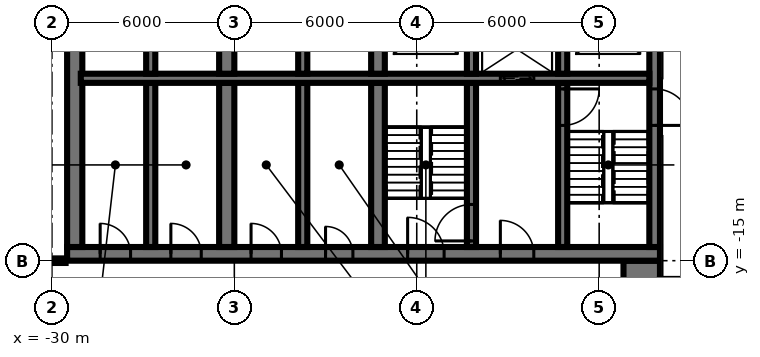
"""IFC4 building model, lengths in metres.
Left out: names, types, materials, properties, quantities, classifications, styles, units other than length and angle.
Written with IfcOpenShell. Run it as: python <this file> out.ifc"""

import sys

from ifc_helpers import new_model, si_unit, direction, frame, frame_2d, origin, place, context, subcontext, project, spatial, rectangle, extrude, element, fill, save


model = new_model("IFC4")
c1 = context("Model", 3, precision=1e-05, world=origin(), true_north=direction((0.0, 1.0)))
c2 = subcontext(c1, "Body", "Model", "MODEL_VIEW")
j1 = project(units=[si_unit("LENGTHUNIT", "METRE"), si_unit("PLANEANGLEUNIT", "RADIAN")], contexts=[c1])
p1 = place(None, origin())
s1 = spatial("IfcSite", under=j1, at=p1, CompositionType="ELEMENT")
p2 = place(p1, origin())
s2 = spatial("IfcBuilding", under=s1, at=p2, CompositionType="ELEMENT")
p3 = place(p2, origin())
s3 = spatial("IfcBuildingStorey", under=s2, at=p3, CompositionType="ELEMENT", Elevation=0.0)
p4 = place(p3, frame((-29.5, -14.775, -0.3), z_axis=(0.0, 0.0, 1.0), x_axis=(1.0, 0.0, 0.0)))
e1 = element("IfcWall", 1, at=p4, inside=s3, PredefinedType="SHEAR", context=c2, shape_type="SweptSolid", body=[
    extrude(rectangle(XDim=19.5, YDim=0.45, at=frame_2d((9.75, 0.0))), origin(), (0.0, 0.0, 1.0), 7.3),
])
p5 = place(p4, frame((11.2, 0.0, 0.3)))
e2 = element("IfcOpeningElement", 2, at=p5, cuts=e1, PredefinedType="OPENING", context=c2, shape_type="SweptSolid", body=[
    extrude(rectangle(XDim=1.2, YDim=2.1, at=frame_2d((0.6, 1.05))), frame((0.0, 0.235, 0.0), z_axis=(0.0, -1.0, 0.0), x_axis=(1.0, 0.0, 0.0)), (0.0, 0.0, 1.0), 0.47),
])
p6 = place(p4, frame((14.25, 0.0, 0.3)))
e3 = element("IfcOpeningElement", 3, at=p6, cuts=e1, PredefinedType="OPENING", context=c2, shape_type="SweptSolid", body=[
    extrude(rectangle(XDim=1.1, YDim=2.1, at=frame_2d((0.55, 1.05))), frame((0.0, 0.235, 0.0), z_axis=(0.0, -1.0, 0.0), x_axis=(1.0, 0.0, 0.0)), (0.0, 0.0, 1.0), 0.47),
])
p7 = place(p4, frame((8.5, 0.0, 0.3)))
e4 = element("IfcOpeningElement", 4, at=p7, cuts=e1, PredefinedType="OPENING", context=c2, shape_type="SweptSolid", body=[
    extrude(rectangle(XDim=0.9, YDim=2.1, at=frame_2d((0.45, 1.05))), frame((0.0, 0.235, 0.0), z_axis=(0.0, -1.0, 0.0), x_axis=(1.0, 0.0, 0.0)), (0.0, 0.0, 1.0), 0.47),
])
p8 = place(p4, frame((6.05, 0.0, 0.3)))
e5 = element("IfcOpeningElement", 5, at=p8, cuts=e1, PredefinedType="OPENING", context=c2, shape_type="SweptSolid", body=[
    extrude(rectangle(XDim=1.0, YDim=2.1, at=frame_2d((0.5, 1.05))), frame((0.0, 0.235, 0.0), z_axis=(0.0, -1.0, 0.0), x_axis=(1.0, 0.0, 0.0)), (0.0, 0.0, 1.0), 0.47),
])
p9 = place(p4, frame((3.413, 0.0, 0.3)))
e6 = element("IfcOpeningElement", 6, at=p9, cuts=e1, PredefinedType="OPENING", context=c2, shape_type="SweptSolid", body=[
    extrude(rectangle(XDim=1.0, YDim=2.1, at=frame_2d((0.5, 1.05))), frame((0.0, 0.235, 0.0), z_axis=(0.0, -1.0, 0.0), x_axis=(1.0, 0.0, 0.0)), (0.0, 0.0, 1.0), 0.47),
])
p10 = place(p4, frame((1.087, 0.0, 0.3)))
e7 = element("IfcOpeningElement", 7, at=p10, cuts=e1, PredefinedType="OPENING", context=c2, shape_type="SweptSolid", body=[
    extrude(rectangle(XDim=1.0, YDim=2.1, at=frame_2d((0.5, 1.05))), frame((0.0, 0.235, 0.0), z_axis=(0.0, -1.0, 0.0), x_axis=(1.0, 0.0, 0.0)), (0.0, 0.0, 1.0), 0.47),
])
p11 = place(p3, frame((-10.175, -14.55, -0.3), z_axis=(0.0, 0.0, 1.0), x_axis=(0.0, 1.0, 0.0)))
e8 = element("IfcWall", 8, at=p11, inside=s3, PredefinedType="SHEAR", context=c2, shape_type="SweptSolid", body=[
    extrude(rectangle(XDim=14.1, YDim=0.35, at=frame_2d((7.05, 0.0))), origin(), (0.0, 0.0, 1.0), 7.3),
])
p12 = place(p11, frame((8.4, 0.0, 0.3)))
e9 = element("IfcOpeningElement", 9, at=p12, cuts=e8, PredefinedType="OPENING", context=c2, shape_type="SweptSolid", body=[
    extrude(rectangle(XDim=1.4, YDim=2.4, at=frame_2d((0.7, 1.2))), frame((0.0, 0.185, 0.0), z_axis=(0.0, -1.0, 0.0), x_axis=(1.0, 0.0, 0.0)), (0.0, 0.0, 1.0), 0.37),
])
p13 = place(p11, frame((10.0, 0.0, 0.3)))
e10 = element("IfcOpeningElement", 10, at=p13, cuts=e8, PredefinedType="OPENING", context=c2, shape_type="SweptSolid", body=[
    extrude(rectangle(XDim=1.4, YDim=2.4, at=frame_2d((0.7, 1.2))), frame((0.0, 0.185, 0.0), z_axis=(0.0, -1.0, 0.0), x_axis=(1.0, 0.0, 0.0)), (0.0, 0.0, 1.0), 0.37),
])
p14 = place(p11, frame((4.0, 0.0, 0.3)))
e11 = element("IfcOpeningElement", 11, at=p14, cuts=e8, PredefinedType="OPENING", context=c2, shape_type="SweptSolid", body=[
    extrude(rectangle(XDim=1.2, YDim=2.1, at=frame_2d((0.6, 1.05))), frame((0.0, 0.185, 0.0), z_axis=(0.0, -1.0, 0.0), x_axis=(1.0, 0.0, 0.0)), (0.0, 0.0, 1.0), 0.37),
])
p15 = place(p3, frame((-29.25, -14.55, -0.3), z_axis=(0.0, 0.0, 1.0), x_axis=(0.0, 1.0, 0.0)))
e12 = element("IfcWall", 12, at=p15, inside=s3, PredefinedType="SHEAR", context=c2, shape_type="SweptSolid", body=[
    extrude(rectangle(XDim=14.1, YDim=0.5, at=frame_2d((7.05, 0.0))), origin(), (0.0, 0.0, 1.0), 7.3),
])
p16 = place(p3, frame((-29.05, -9.0, -0.3), z_axis=(0.0, 0.0, 1.0), x_axis=(1.0, 0.0, 0.0)))
e13 = element("IfcWall", 13, at=p16, inside=s3, PredefinedType="SHEAR", context=c2, shape_type="SweptSolid", body=[
    extrude(rectangle(XDim=18.7, YDim=0.3, at=frame_2d((9.35, 0.0))), origin(), (0.0, 0.0, 1.0), 7.3),
])
p17 = place(p16, frame((13.8, 0.0, 0.3)))
e14 = element("IfcOpeningElement", 14, at=p17, cuts=e13, PredefinedType="OPENING", context=c2, shape_type="SweptSolid", body=[
    extrude(rectangle(XDim=1.1, YDim=2.1, at=frame_2d((0.55, 1.05))), frame((0.0, 0.16, 0.0), z_axis=(0.0, -1.0, 0.0), x_axis=(1.0, 0.0, 0.0)), (0.0, 0.0, 1.0), 0.32),
])
p18 = place(p3, frame((-13.2, -8.85, -0.3), z_axis=(0.0, 0.0, 1.0), x_axis=(0.0, 1.0, 0.0)))
e15 = element("IfcWall", 15, at=p18, inside=s3, PredefinedType="SHEAR", context=c2, shape_type="SweptSolid", body=[
    extrude(rectangle(XDim=2.3, YDim=0.3, at=frame_2d((1.15, 0.0))), origin(), (0.0, 0.0, 1.0), 7.3),
])
p19 = place(p3, frame((-13.2, -14.55, -0.3), z_axis=(0.0, 0.0, 1.0), x_axis=(0.0, 1.0, 0.0)))
e16 = element("IfcWall", 16, at=p19, inside=s3, PredefinedType="SHEAR", context=c2, shape_type="SweptSolid", body=[
    extrude(rectangle(XDim=5.4, YDim=0.3, at=frame_2d((2.7, 0.0))), origin(), (0.0, 0.0, 1.0), 7.3),
])
p20 = place(p19, frame((4.0, 0.0, 0.3)))
e17 = element("IfcOpeningElement", 17, at=p20, cuts=e16, PredefinedType="OPENING", context=c2, shape_type="SweptSolid", body=[
    extrude(rectangle(XDim=1.2, YDim=2.1, at=frame_2d((0.6, 1.05))), frame((0.0, 0.16, 0.0), z_axis=(0.0, -1.0, 0.0), x_axis=(1.0, 0.0, 0.0)), (0.0, 0.0, 1.0), 0.32),
])
p21 = place(p3, frame((-16.2, -8.85, -0.3), z_axis=(0.0, 0.0, 1.0), x_axis=(0.0, 1.0, 0.0)))
e18 = element("IfcWall", 18, at=p21, inside=s3, PredefinedType="SHEAR", context=c2, shape_type="SweptSolid", body=[
    extrude(rectangle(XDim=2.3, YDim=0.3, at=frame_2d((1.15, 0.0))), origin(), (0.0, 0.0, 1.0), 7.3),
])
p22 = place(p3, frame((-16.2, -14.55, -0.3), z_axis=(0.0, 0.0, 1.0), x_axis=(0.0, 1.0, 0.0)))
e19 = element("IfcWall", 19, at=p22, inside=s3, PredefinedType="SHEAR", context=c2, shape_type="SweptSolid", body=[
    extrude(rectangle(XDim=5.4, YDim=0.3, at=frame_2d((2.7, 0.0))), origin(), (0.0, 0.0, 1.0), 7.3),
])
p23 = place(p22, frame((0.2, 0.0, 0.3)))
e20 = element("IfcOpeningElement", 20, at=p23, cuts=e19, PredefinedType="OPENING", context=c2, shape_type="SweptSolid", body=[
    extrude(rectangle(XDim=1.2, YDim=2.1, at=frame_2d((0.6, 1.05))), frame((0.0, 0.16, 0.0), z_axis=(0.0, -1.0, 0.0), x_axis=(1.0, 0.0, 0.0)), (0.0, 0.0, 1.0), 0.32),
])
p24 = place(p3, frame((-19.275, -8.85, -0.3), z_axis=(0.0, 0.0, 1.0), x_axis=(0.0, 1.0, 0.0)))
e21 = element("IfcWall", 21, at=p24, inside=s3, PredefinedType="SHEAR", context=c2, shape_type="SweptSolid", body=[
    extrude(rectangle(XDim=2.3, YDim=0.45, at=frame_2d((1.15, 0.0))), origin(), (0.0, 0.0, 1.0), 7.3),
])
p25 = place(p3, frame((-19.275, -14.55, -0.3), z_axis=(0.0, 0.0, 1.0), x_axis=(0.0, 1.0, 0.0)))
e22 = element("IfcWall", 22, at=p25, inside=s3, PredefinedType="SHEAR", context=c2, shape_type="SweptSolid", body=[
    extrude(rectangle(XDim=5.4, YDim=0.45, at=frame_2d((2.7, 0.0))), origin(), (0.0, 0.0, 1.0), 7.3),
])
p26 = place(p3, frame((-21.75, -8.85, -0.3), z_axis=(0.0, 0.0, 1.0), x_axis=(0.0, 1.0, 0.0)))
e23 = element("IfcWall", 23, at=p26, inside=s3, PredefinedType="SHEAR", context=c2, shape_type="SweptSolid", body=[
    extrude(rectangle(XDim=2.3, YDim=0.3, at=frame_2d((1.15, 0.0))), origin(), (0.0, 0.0, 1.0), 7.3),
])
p27 = place(p3, frame((-21.75, -14.55, -0.3), z_axis=(0.0, 0.0, 1.0), x_axis=(0.0, 1.0, 0.0)))
e24 = element("IfcWall", 24, at=p27, inside=s3, PredefinedType="SHEAR", context=c2, shape_type="SweptSolid", body=[
    extrude(rectangle(XDim=5.4, YDim=0.3, at=frame_2d((2.7, 0.0))), origin(), (0.0, 0.0, 1.0), 7.3),
])
p28 = place(p3, frame((-24.25, -8.85, -0.3), z_axis=(0.0, 0.0, 1.0), x_axis=(0.0, 1.0, 0.0)))
e25 = element("IfcWall", 25, at=p28, inside=s3, PredefinedType="SHEAR", context=c2, shape_type="SweptSolid", body=[
    extrude(rectangle(XDim=2.3, YDim=0.5, at=frame_2d((1.15, 0.0))), origin(), (0.0, 0.0, 1.0), 7.3),
])
p29 = place(p3, frame((-24.25, -14.55, -0.3), z_axis=(0.0, 0.0, 1.0), x_axis=(0.0, 1.0, 0.0)))
e26 = element("IfcWall", 26, at=p29, inside=s3, PredefinedType="SHEAR", context=c2, shape_type="SweptSolid", body=[
    extrude(rectangle(XDim=5.4, YDim=0.5, at=frame_2d((2.7, 0.0))), origin(), (0.0, 0.0, 1.0), 7.3),
])
p30 = place(p3, frame((-26.75, -8.85, -0.3), z_axis=(0.0, 0.0, 1.0), x_axis=(0.0, 1.0, 0.0)))
e27 = element("IfcWall", 27, at=p30, inside=s3, PredefinedType="SHEAR", context=c2, shape_type="SweptSolid", body=[
    extrude(rectangle(XDim=2.3, YDim=0.3, at=frame_2d((1.15, 0.0))), origin(), (0.0, 0.0, 1.0), 7.3),
])
p31 = place(p3, frame((-26.75, -14.55, -0.3), z_axis=(0.0, 0.0, 1.0), x_axis=(0.0, 1.0, 0.0)))
e28 = element("IfcWall", 28, at=p31, inside=s3, PredefinedType="SHEAR", context=c2, shape_type="SweptSolid", body=[
    extrude(rectangle(XDim=5.4, YDim=0.3, at=frame_2d((2.7, 0.0))), origin(), (0.0, 0.0, 1.0), 7.3),
])
p32 = place(p3, frame((-10.6, -40.0, -0.3), z_axis=(0.0, 0.0, 1.0), x_axis=(0.0, 1.0, 0.0)))
e29 = element("IfcWall", 29, at=p32, inside=s3, PredefinedType="SHEAR", context=c2, shape_type="SweptSolid", body=[
    extrude(rectangle(XDim=25.0, YDim=1.2, at=frame_2d((12.5, 0.0))), origin(), (0.0, 0.0, 1.0), 7.3),
])
p33 = place(p32, frame((8.8, 0.0, 0.3)))
e30 = element("IfcOpeningElement", 30, at=p33, cuts=e29, PredefinedType="OPENING", context=c2, shape_type="SweptSolid", body=[
    extrude(rectangle(XDim=2.4, YDim=2.7, at=frame_2d((1.2, 1.35))), frame((0.0, 0.61, 0.0), z_axis=(0.0, -1.0, 0.0), x_axis=(1.0, 0.0, 0.0)), (0.0, 0.0, 1.0), 1.22),
])
p34 = place(p3, frame((-47.82, -15.0, 0.0), z_axis=(0.0, 0.0, 1.0), x_axis=(1.0, 0.0, 0.0)))
e31 = element("IfcWall", 31, at=p34, inside=s3, PredefinedType="PARTITIONING", context=c2, shape_type="SweptSolid", body=[
    extrude(rectangle(XDim=18.27, YDim=0.15, at=frame_2d((9.135, 0.0))), origin(), (0.0, 0.0, 1.0), 6.55),
])
p35 = place(p34, frame((1.62, 0.0, 0.0)))
e32 = element("IfcOpeningElement", 32, at=p35, cuts=e31, PredefinedType="OPENING", context=c2, shape_type="SweptSolid", body=[
    extrude(rectangle(XDim=1.0, YDim=2.1, at=frame_2d((0.5, 1.05))), frame((0.0, 0.085, 0.0), z_axis=(0.0, -1.0, 0.0), x_axis=(1.0, 0.0, 0.0)), (0.0, 0.0, 1.0), 0.17),
])
p36 = place(p34, frame((3.84, 0.0, 0.0)))
e33 = element("IfcOpeningElement", 33, at=p36, cuts=e31, PredefinedType="OPENING", context=c2, shape_type="SweptSolid", body=[
    extrude(rectangle(XDim=1.0, YDim=2.1, at=frame_2d((0.5, 1.05))), frame((0.0, 0.085, 0.0), z_axis=(0.0, -1.0, 0.0), x_axis=(1.0, 0.0, 0.0)), (0.0, 0.0, 1.0), 0.17),
])
p37 = place(p34, frame((8.34, 0.0, 0.0)))
e34 = element("IfcOpeningElement", 34, at=p37, cuts=e31, PredefinedType="OPENING", context=c2, shape_type="SweptSolid", body=[
    extrude(rectangle(XDim=1.0, YDim=2.1, at=frame_2d((0.5, 1.05))), frame((0.0, 0.085, 0.0), z_axis=(0.0, -1.0, 0.0), x_axis=(1.0, 0.0, 0.0)), (0.0, 0.0, 1.0), 0.17),
])
p38 = place(p34, frame((14.59, 0.0, 0.0)))
e35 = element("IfcOpeningElement", 35, at=p38, cuts=e31, PredefinedType="OPENING", context=c2, shape_type="SweptSolid", body=[
    extrude(rectangle(XDim=1.0, YDim=2.1, at=frame_2d((0.5, 1.05))), frame((0.0, 0.085, 0.0), z_axis=(0.0, -1.0, 0.0), x_axis=(1.0, 0.0, 0.0)), (0.0, 0.0, 1.0), 0.17),
])
p39 = place(p17, origin())
e36 = element("IfcDoor", 36, at=p39, inside=s3, OperationType="DOUBLE_DOOR_SLIDING", PredefinedType="USERDEFINED", context=c2, shape_type="SweptSolid", body=[
    extrude(rectangle(XDim=1.1, YDim=2.1, at=frame_2d((0.55, 1.05))), frame((0.0, 0.025, 0.0), z_axis=(0.0, -1.0, 0.0), x_axis=(1.0, 0.0, 0.0)), (0.0, 0.0, 1.0), 0.05),
])
fill(e14, e36)
p40 = place(p14, frame((0.6, 0.0, 0.0), z_axis=(0.0, 0.0, 1.0), x_axis=(-1.0, 0.0, 0.0)))
e37 = element("IfcDoor", 37, at=p40, inside=s3, OperationType="SINGLE_SWING_LEFT", PredefinedType="DOOR", context=c2, shape_type="SweptSolid", body=[
    extrude(rectangle(XDim=1.2, YDim=2.1, at=frame_2d((0.0, 1.05))), frame((0.0, -0.025, 0.0), z_axis=(0.0, 1.0, 0.0), x_axis=(-1.0, 0.0, 0.0)), (0.0, 0.0, 1.0), 0.05),
])
fill(e11, e37)
p41 = place(p5, origin())
e38 = element("IfcDoor", 38, at=p41, inside=s3, OperationType="SINGLE_SWING_RIGHT", PredefinedType="DOOR", context=c2, shape_type="SweptSolid", body=[
    extrude(rectangle(XDim=1.2, YDim=2.1, at=frame_2d((0.6, 1.05))), frame((0.0, 0.025, 0.0), z_axis=(0.0, -1.0, 0.0), x_axis=(1.0, 0.0, 0.0)), (0.0, 0.0, 1.0), 0.05),
])
fill(e2, e38)
p42 = place(p6, origin())
e39 = element("IfcDoor", 39, at=p42, inside=s3, OperationType="SINGLE_SWING_RIGHT", PredefinedType="DOOR", context=c2, shape_type="SweptSolid", body=[
    extrude(rectangle(XDim=1.1, YDim=2.1, at=frame_2d((0.55, 1.05))), frame((0.0, 0.025, 0.0), z_axis=(0.0, -1.0, 0.0), x_axis=(1.0, 0.0, 0.0)), (0.0, 0.0, 1.0), 0.05),
])
fill(e3, e39)
p43 = place(p7, origin())
e40 = element("IfcDoor", 40, at=p43, inside=s3, OperationType="SINGLE_SWING_RIGHT", PredefinedType="DOOR", context=c2, shape_type="SweptSolid", body=[
    extrude(rectangle(XDim=0.9, YDim=2.1, at=frame_2d((0.45, 1.05))), frame((0.0, 0.025, 0.0), z_axis=(0.0, -1.0, 0.0), x_axis=(1.0, 0.0, 0.0)), (0.0, 0.0, 1.0), 0.05),
])
fill(e4, e40)
p44 = place(p8, origin())
e41 = element("IfcDoor", 41, at=p44, inside=s3, OperationType="SINGLE_SWING_RIGHT", PredefinedType="DOOR", context=c2, shape_type="SweptSolid", body=[
    extrude(rectangle(XDim=1.0, YDim=2.1, at=frame_2d((0.5, 1.05))), frame((0.0, 0.025, 0.0), z_axis=(0.0, -1.0, 0.0), x_axis=(1.0, 0.0, 0.0)), (0.0, 0.0, 1.0), 0.05),
])
fill(e5, e41)
p45 = place(p9, origin())
e42 = element("IfcDoor", 42, at=p45, inside=s3, OperationType="SINGLE_SWING_RIGHT", PredefinedType="DOOR", context=c2, shape_type="SweptSolid", body=[
    extrude(rectangle(XDim=1.0, YDim=2.1, at=frame_2d((0.5, 1.05))), frame((0.0, 0.025, 0.0), z_axis=(0.0, -1.0, 0.0), x_axis=(1.0, 0.0, 0.0)), (0.0, 0.0, 1.0), 0.05),
])
fill(e6, e42)
p46 = place(p10, origin())
e43 = element("IfcDoor", 43, at=p46, inside=s3, OperationType="SINGLE_SWING_RIGHT", PredefinedType="DOOR", context=c2, shape_type="SweptSolid", body=[
    extrude(rectangle(XDim=1.0, YDim=2.1, at=frame_2d((0.5, 1.05))), frame((0.0, 0.025, 0.0), z_axis=(0.0, -1.0, 0.0), x_axis=(1.0, 0.0, 0.0)), (0.0, 0.0, 1.0), 0.05),
])
fill(e7, e43)
p47 = place(p20, frame((0.6, 0.0, 0.0), z_axis=(0.0, 0.0, 1.0), x_axis=(-1.0, 0.0, 0.0)))
e44 = element("IfcDoor", 44, at=p47, inside=s3, OperationType="SINGLE_SWING_RIGHT", PredefinedType="DOOR", context=c2, shape_type="SweptSolid", body=[
    extrude(rectangle(XDim=1.2, YDim=2.1, at=frame_2d((0.0, 1.05))), frame((0.0, -0.025, 0.0), z_axis=(0.0, 1.0, 0.0), x_axis=(-1.0, 0.0, 0.0)), (0.0, 0.0, 1.0), 0.05),
])
fill(e17, e44)
p48 = place(p23, origin())
e45 = element("IfcDoor", 45, at=p48, inside=s3, OperationType="SINGLE_SWING_RIGHT", PredefinedType="DOOR", context=c2, shape_type="SweptSolid", body=[
    extrude(rectangle(XDim=1.2, YDim=2.1, at=frame_2d((0.6, 1.05))), frame((0.0, 0.025, 0.0), z_axis=(0.0, -1.0, 0.0), x_axis=(1.0, 0.0, 0.0)), (0.0, 0.0, 1.0), 0.05),
])
fill(e20, e45)
save(model, sys.argv[1])
